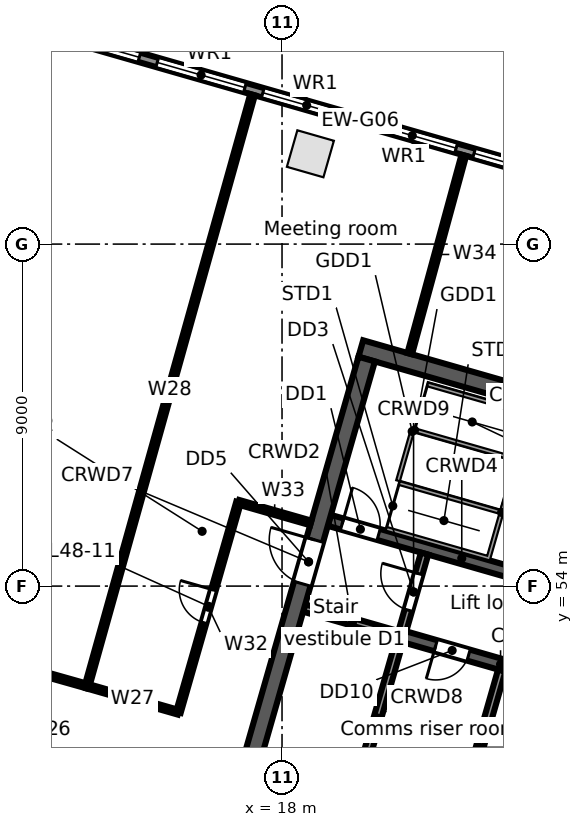
"""IFC4 building model, lengths in metres.
Left out: names, types, materials, properties, quantities, classifications, styles, units other than length and angle.
Written with IfcOpenShell. Run it as: python <this file> out.ifc"""

import sys

from ifc_helpers import new_model, si_unit, direction, frame, frame_2d, origin, origin_2d, place, context, subcontext, project, spatial, rectangle, extrude, element, fill, save


model = new_model("IFC4")
c1 = context("Model", 3, precision=1e-05, world=origin(), true_north=direction((0.0, 1.0)))
c2 = subcontext(c1, "Body", "Model", "MODEL_VIEW")
j1 = project(units=[si_unit("LENGTHUNIT", "METRE"), si_unit("PLANEANGLEUNIT", "RADIAN")], contexts=[c1])
p1 = place(None, origin())
s1 = spatial("IfcSite", under=j1, at=p1, CompositionType="ELEMENT")
p2 = place(p1, origin())
s2 = spatial("IfcBuilding", under=s1, at=p2, CompositionType="ELEMENT")
p3 = place(p2, frame((0.0, 0.0, 227.0)))
s3 = spatial("IfcBuildingStorey", under=s2, at=p3, CompositionType="ELEMENT", Elevation=227.0)
p4 = place(p3, frame((18.746, 65.376, 0.0), z_axis=(0.0, 0.0, 1.0), x_axis=(-0.961261695938, 0.275637355817, 0.0)))
e1 = element("IfcColumn", 1, at=p4, inside=s3, PredefinedType="COLUMN", context=c2, shape_type="SweptSolid", body=[
    extrude(rectangle(XDim=1.0, YDim=1.0, at=origin_2d()), origin(), (0.0, 0.0, 1.0), 3.9),
])
p5 = place(p3, frame((3.34, 71.042, 0.0), z_axis=(0.0, 0.0, 1.0), x_axis=(0.96126179431, -0.275637012753, 0.0)))
e2 = element("IfcWall", 2, at=p5, inside=s3, PredefinedType="STANDARD", context=c2, shape_type="SweptSolid", body=[
    extrude(rectangle(XDim=34.779, YDim=0.25, at=frame_2d((17.39, 0.0))), origin(), (0.0, 0.0, 1.0), 3.55),
])
p6 = place(p5, frame((32.071, 0.0, 0.8)))
e3 = element("IfcOpeningElement", 3, at=p6, cuts=e2, PredefinedType="OPENING", context=c2, shape_type="SweptSolid", body=[
    extrude(rectangle(XDim=2.4, YDim=2.2, at=frame_2d((1.2, 1.1))), frame((0.0, 0.135, 0.0), z_axis=(0.0, -1.0, 0.0), x_axis=(1.0, 0.0, 0.0)), (0.0, 0.0, 1.0), 0.27),
])
p7 = place(p5, frame((29.18, 0.0, 0.8)))
e4 = element("IfcOpeningElement", 4, at=p7, cuts=e2, PredefinedType="OPENING", context=c2, shape_type="SweptSolid", body=[
    extrude(rectangle(XDim=2.4, YDim=2.2, at=frame_2d((1.2, 1.1))), frame((0.0, 0.135, 0.0), z_axis=(0.0, -1.0, 0.0), x_axis=(1.0, 0.0, 0.0)), (0.0, 0.0, 1.0), 0.27),
])
p8 = place(p5, frame((26.289, 0.0, 0.8)))
e5 = element("IfcOpeningElement", 5, at=p8, cuts=e2, PredefinedType="OPENING", context=c2, shape_type="SweptSolid", body=[
    extrude(rectangle(XDim=2.4, YDim=2.2, at=frame_2d((1.2, 1.1))), frame((0.0, 0.135, 0.0), z_axis=(0.0, -1.0, 0.0), x_axis=(1.0, 0.0, 0.0)), (0.0, 0.0, 1.0), 0.27),
])
p9 = place(p5, frame((23.398, 0.0, 0.8)))
e6 = element("IfcOpeningElement", 6, at=p9, cuts=e2, PredefinedType="OPENING", context=c2, shape_type="SweptSolid", body=[
    extrude(rectangle(XDim=2.4, YDim=2.2, at=frame_2d((1.2, 1.1))), frame((0.0, 0.135, 0.0), z_axis=(0.0, -1.0, 0.0), x_axis=(1.0, 0.0, 0.0)), (0.0, 0.0, 1.0), 0.27),
])
p10 = place(p5, frame((20.508, 0.0, 0.8)))
e7 = element("IfcOpeningElement", 7, at=p10, cuts=e2, PredefinedType="OPENING", context=c2, shape_type="SweptSolid", body=[
    extrude(rectangle(XDim=2.4, YDim=2.2, at=frame_2d((1.2, 1.1))), frame((0.0, 0.135, 0.0), z_axis=(0.0, -1.0, 0.0), x_axis=(1.0, 0.0, 0.0)), (0.0, 0.0, 1.0), 0.27),
])
p11 = place(p5, frame((17.616, 0.0, 0.8)))
e8 = element("IfcOpeningElement", 8, at=p11, cuts=e2, PredefinedType="OPENING", context=c2, shape_type="SweptSolid", body=[
    extrude(rectangle(XDim=2.4, YDim=2.2, at=frame_2d((1.2, 1.1))), frame((0.0, 0.135, 0.0), z_axis=(0.0, -1.0, 0.0), x_axis=(1.0, 0.0, 0.0)), (0.0, 0.0, 1.0), 0.27),
])
p12 = place(p5, frame((14.726, 0.0, 0.8)))
e9 = element("IfcOpeningElement", 9, at=p12, cuts=e2, PredefinedType="OPENING", context=c2, shape_type="SweptSolid", body=[
    extrude(rectangle(XDim=2.4, YDim=2.2, at=frame_2d((1.2, 1.1))), frame((0.0, 0.135, 0.0), z_axis=(0.0, -1.0, 0.0), x_axis=(1.0, 0.0, 0.0)), (0.0, 0.0, 1.0), 0.27),
])
p13 = place(p5, frame((11.834, 0.0, 0.8)))
e10 = element("IfcOpeningElement", 10, at=p13, cuts=e2, PredefinedType="OPENING", context=c2, shape_type="SweptSolid", body=[
    extrude(rectangle(XDim=2.4, YDim=2.2, at=frame_2d((1.2, 1.1))), frame((0.0, 0.135, 0.0), z_axis=(0.0, -1.0, 0.0), x_axis=(1.0, 0.0, 0.0)), (0.0, 0.0, 1.0), 0.27),
])
p14 = place(p5, frame((8.944, 0.0, 0.8)))
e11 = element("IfcOpeningElement", 11, at=p14, cuts=e2, PredefinedType="OPENING", context=c2, shape_type="SweptSolid", body=[
    extrude(rectangle(XDim=2.4, YDim=2.2, at=frame_2d((1.2, 1.1))), frame((0.0, 0.135, 0.0), z_axis=(0.0, -1.0, 0.0), x_axis=(1.0, 0.0, 0.0)), (0.0, 0.0, 1.0), 0.27),
])
p15 = place(p5, frame((6.052, 0.0, 0.8)))
e12 = element("IfcOpeningElement", 12, at=p15, cuts=e2, PredefinedType="OPENING", context=c2, shape_type="SweptSolid", body=[
    extrude(rectangle(XDim=2.4, YDim=2.2, at=frame_2d((1.2, 1.1))), frame((0.0, 0.135, 0.0), z_axis=(0.0, -1.0, 0.0), x_axis=(1.0, 0.0, 0.0)), (0.0, 0.0, 1.0), 0.27),
])
p16 = place(p5, frame((3.162, 0.0, 0.8)))
e13 = element("IfcOpeningElement", 13, at=p16, cuts=e2, PredefinedType="OPENING", context=c2, shape_type="SweptSolid", body=[
    extrude(rectangle(XDim=2.4, YDim=2.2, at=frame_2d((1.2, 1.1))), frame((0.0, 0.135, 0.0), z_axis=(0.0, -1.0, 0.0), x_axis=(1.0, 0.0, 0.0)), (0.0, 0.0, 1.0), 0.27),
])
p17 = place(p5, frame((0.271, 0.0, 0.8)))
e14 = element("IfcOpeningElement", 14, at=p17, cuts=e2, PredefinedType="OPENING", context=c2, shape_type="SweptSolid", body=[
    extrude(rectangle(XDim=2.4, YDim=2.2, at=frame_2d((1.2, 1.1))), frame((0.0, 0.135, 0.0), z_axis=(0.0, -1.0, 0.0), x_axis=(1.0, 0.0, 0.0)), (0.0, 0.0, 1.0), 0.27),
])
p18 = place(p3, frame((18.583, 53.423, 0.0), z_axis=(0.0, 0.0, 1.0), x_axis=(0.961259287968, -0.275645753268, 0.0)))
e15 = element("IfcWall", 15, at=p18, inside=s3, PredefinedType="SOLIDWALL", context=c2, shape_type="SweptSolid", body=[
    extrude(rectangle(XDim=2.65, YDim=0.2, at=frame_2d((1.325, 0.0))), origin(), (0.0, 0.0, 1.0), 3.55),
])
p19 = place(p3, frame((21.131, 52.692, 0.0), z_axis=(0.0, 0.0, 1.0), x_axis=(0.961261488075, -0.275638080722, 0.0)))
e16 = element("IfcWall", 16, at=p19, inside=s3, PredefinedType="SOLIDWALL", context=c2, shape_type="SweptSolid", body=[
    extrude(rectangle(XDim=5.45, YDim=0.3, at=frame_2d((2.725, 0.0))), origin(), (0.0, 0.0, 1.0), 3.55),
])
p20 = place(p19, frame((0.95, 0.0, 0.0)))
e17 = element("IfcOpeningElement", 17, at=p20, cuts=e16, PredefinedType="OPENING", context=c2, shape_type="SweptSolid", body=[
    extrude(rectangle(XDim=0.9, YDim=2.1, at=frame_2d((0.45, 1.05))), frame((0.0, 0.16, 0.0), z_axis=(0.0, -1.0, 0.0), x_axis=(1.0, 0.0, 0.0)), (0.0, 0.0, 1.0), 0.32),
])
p21 = place(p19, frame((3.75, 0.0, 0.0)))
e18 = element("IfcOpeningElement", 18, at=p21, cuts=e16, PredefinedType="OPENING", context=c2, shape_type="SweptSolid", body=[
    extrude(rectangle(XDim=0.9, YDim=2.1, at=frame_2d((0.45, 1.05))), frame((0.0, 0.16, 0.0), z_axis=(0.0, -1.0, 0.0), x_axis=(1.0, 0.0, 0.0)), (0.0, 0.0, 1.0), 0.32),
])
p22 = place(p3, frame((19.245, 55.73, 0.0), z_axis=(0.0, 0.0, 1.0), x_axis=(0.961263007877, -0.275632780503, 0.0)))
e19 = element("IfcWall", 19, at=p22, inside=s3, PredefinedType="SOLIDWALL", context=c2, shape_type="SweptSolid", body=[
    extrude(rectangle(XDim=7.25, YDim=0.3, at=frame_2d((3.625, 0.0))), origin(), (0.0, 0.0, 1.0), 3.55),
])
p23 = place(p22, frame((0.35, 0.0, 0.0)))
e20 = element("IfcOpeningElement", 20, at=p23, cuts=e19, PredefinedType="OPENING", context=c2, shape_type="SweptSolid", body=[
    extrude(rectangle(XDim=1.0, YDim=2.1, at=frame_2d((0.5, 1.05))), frame((0.0, 0.16, 0.0), z_axis=(0.0, -1.0, 0.0), x_axis=(1.0, 0.0, 0.0)), (0.0, 0.0, 1.0), 0.32),
])
p24 = place(p3, frame((20.073, 60.252, 0.0), z_axis=(0.0, 0.0, 1.0), x_axis=(0.96126248289, -0.275634611374, 0.0)))
e21 = element("IfcWall", 21, at=p24, inside=s3, PredefinedType="SOLIDWALL", context=c2, shape_type="SweptSolid", body=[
    extrude(rectangle(XDim=9.0, YDim=0.45, at=frame_2d((4.5, 0.0))), origin(), (0.0, 0.0, 1.0), 3.55),
])
p25 = place(p3, frame((17.168, 49.303, 0.0), z_axis=(0.0, 0.0, 1.0), x_axis=(0.275638974822, 0.961261231695, 0.0)))
e22 = element("IfcWall", 22, at=p25, inside=s3, PredefinedType="SOLIDWALL", context=c2, shape_type="SweptSolid", body=[
    extrude(rectangle(XDim=11.1, YDim=0.45, at=frame_2d((5.55, 0.0))), origin(), (0.0, 0.0, 1.0), 3.55),
])
p26 = place(p25, frame((4.95, 0.0, 0.0)))
e23 = element("IfcOpeningElement", 23, at=p26, cuts=e22, PredefinedType="OPENING", context=c2, shape_type="SweptSolid", body=[
    extrude(rectangle(XDim=1.2, YDim=2.1, at=frame_2d((0.6, 1.05))), frame((0.0, 0.235, 0.0), z_axis=(0.0, -1.0, 0.0), x_axis=(1.0, 0.0, 0.0)), (0.0, 0.0, 1.0), 0.47),
])
p27 = place(p3, frame((19.932, 48.511, 0.0), z_axis=(0.0, 0.0, 1.0), x_axis=(0.275642273411, 0.961260285827, 0.0)))
e24 = element("IfcWall", 24, at=p27, inside=s3, PredefinedType="SOLIDWALL", context=c2, shape_type="SweptSolid", body=[
    extrude(rectangle(XDim=4.2, YDim=0.2, at=frame_2d((2.1, 0.0))), origin(), (0.0, 0.0, 1.0), 3.55),
])
p28 = place(p3, frame((21.172, 52.837, 0.0), z_axis=(0.0, 0.0, 1.0), x_axis=(0.275657676022, 0.961255868981, 0.0)))
e25 = element("IfcWall", 25, at=p28, inside=s3, PredefinedType="PARTITIONING", context=c2, shape_type="SweptSolid", body=[
    extrude(rectangle(XDim=2.1, YDim=0.2, at=frame_2d((1.05, 0.0))), origin(), (0.0, 0.0, 1.0), 3.55),
])
p29 = place(p28, frame((0.55, 0.0, 0.0)))
e26 = element("IfcOpeningElement", 26, at=p29, cuts=e25, PredefinedType="OPENING", context=c2, shape_type="SweptSolid", body=[
    extrude(rectangle(XDim=1.0, YDim=2.1, at=frame_2d((0.5, 1.05))), frame((0.0, 0.11, 0.0), z_axis=(0.0, -1.0, 0.0), x_axis=(1.0, 0.0, 0.0)), (0.0, 0.0, 1.0), 0.22),
])
p30 = place(p3, frame((22.623, 47.739, 0.0), z_axis=(0.0, 0.0, 1.0), x_axis=(0.275642273411, 0.961260285827, 0.0)))
e27 = element("IfcWall", 27, at=p30, inside=s3, PredefinedType="PARTITIONING", context=c2, shape_type="SweptSolid", body=[
    extrude(rectangle(XDim=4.2, YDim=0.2, at=frame_2d((2.1, 0.0))), origin(), (0.0, 0.0, 1.0), 3.55),
])
p31 = place(p3, frame((0.0, 55.0, 0.0), z_axis=(0.0, 0.0, 1.0), x_axis=(0.962402937884, -0.271625818271, 0.0)))
e28 = element("IfcWall", 28, at=p31, inside=s3, PredefinedType="PARTITIONING", context=c2, shape_type="SweptSolid", body=[
    extrude(rectangle(XDim=13.372, YDim=0.125, at=frame_2d((6.686, 0.0))), origin(), (0.0, 0.0, 1.0), 2.618),
])
p32 = place(p31, frame((5.7, 0.0, 0.0)))
e29 = element("IfcOpeningElement", 29, at=p32, cuts=e28, PredefinedType="OPENING", context=c2, shape_type="SweptSolid", body=[
    extrude(rectangle(XDim=1.8, YDim=2.1, at=frame_2d((0.9, 1.05))), frame((0.0, 0.073, 0.0), z_axis=(0.0, -1.0, 0.0), x_axis=(1.0, 0.0, 0.0)), (0.0, 0.0, 1.0), 0.145),
])
p33 = place(p3, frame((6.482, 50.859, 0.0), z_axis=(0.0, 0.0, 1.0), x_axis=(0.961261196169, -0.275639098713, 0.0)))
e30 = element("IfcWall", 30, at=p33, inside=s3, PredefinedType="PARTITIONING", context=c2, shape_type="SweptSolid", body=[
    extrude(rectangle(XDim=8.5, YDim=0.125, at=frame_2d((4.25, 0.0))), origin(), (0.0, 0.0, 1.0), 2.618),
])
p34 = place(p33, frame((3.7, 0.0, 0.0)))
e31 = element("IfcOpeningElement", 31, at=p34, cuts=e30, PredefinedType="OPENING", context=c2, shape_type="SweptSolid", body=[
    extrude(rectangle(XDim=0.9, YDim=2.1, at=frame_2d((0.45, 1.05))), frame((0.0, 0.073, 0.0), z_axis=(0.0, -1.0, 0.0), x_axis=(1.0, 0.0, 0.0)), (0.0, 0.0, 1.0), 0.145),
])
p35 = place(p3, frame((12.869, 51.368, 0.0), z_axis=(0.0, 0.0, 1.0), x_axis=(0.961302601161, -0.275494662382, 0.0)))
e32 = element("IfcWall", 32, at=p35, inside=s3, PredefinedType="PARTITIONING", context=c2, shape_type="SweptSolid", body=[
    extrude(rectangle(XDim=2.501, YDim=0.125, at=frame_2d((1.25, 0.0))), origin(), (0.0, 0.0, 1.0), 3.55),
])
p36 = place(p3, frame((12.869, 51.368, 0.0), z_axis=(0.0, 0.0, 1.0), x_axis=(0.269547555311, 0.962987079574, 0.0)))
e33 = element("IfcWall", 33, at=p36, inside=s3, PredefinedType="PARTITIONING", context=c2, shape_type="SweptSolid", body=[
    extrude(rectangle(XDim=16.161, YDim=0.125, at=frame_2d((8.081, 0.0))), origin(), (0.0, 0.0, 1.0), 2.618),
])
p37 = place(p3, frame((15.273, 50.679, 0.0), z_axis=(0.0, 0.0, 1.0), x_axis=(0.275494973205, 0.961302512084, 0.0)))
e34 = element("IfcWall", 34, at=p37, inside=s3, PredefinedType="PARTITIONING", context=c2, shape_type="SweptSolid", body=[
    extrude(rectangle(XDim=5.75, YDim=0.125, at=frame_2d((2.875, 0.0))), origin(), (0.0, 0.0, 1.0), 2.618),
])
p38 = place(p37, frame((2.45, 0.0, 0.0)))
e35 = element("IfcOpeningElement", 35, at=p38, cuts=e34, PredefinedType="OPENING", context=c2, shape_type="SweptSolid", body=[
    extrude(rectangle(XDim=0.9, YDim=2.1, at=frame_2d((0.45, 1.05))), frame((0.0, 0.073, 0.0), z_axis=(0.0, -1.0, 0.0), x_axis=(1.0, 0.0, 0.0)), (0.0, 0.0, 1.0), 0.145),
])
p39 = place(p3, frame((16.857, 56.206, 0.0), z_axis=(0.0, 0.0, 1.0), x_axis=(0.961383985066, -0.275210525341, 0.0)))
e36 = element("IfcWall", 36, at=p39, inside=s3, PredefinedType="PARTITIONING", context=c2, shape_type="SweptSolid", body=[
    extrude(rectangle(XDim=1.977, YDim=0.125, at=frame_2d((0.988, 0.0))), origin(), (0.0, 0.0, 1.0), 3.55),
])
p40 = place(p3, frame((21.36, 60.117, 0.0), z_axis=(0.0, 0.0, 1.0), x_axis=(0.263151767798, 0.964754449124, 0.0)))
e37 = element("IfcWall", 37, at=p40, inside=s3, PredefinedType="PARTITIONING", context=c2, shape_type="SweptSolid", body=[
    extrude(rectangle(XDim=5.411, YDim=0.125, at=frame_2d((2.705, 0.0))), origin(), (0.0, 0.0, 1.0), 2.918),
])
p41 = place(p10, origin())
e38 = element("IfcWindow", 38, at=p41, inside=s3, PartitioningType="SINGLE_PANEL", PredefinedType="WINDOW", context=c2, shape_type="SweptSolid", body=[
    extrude(rectangle(XDim=2.4, YDim=2.2, at=frame_2d((1.2, 1.1))), frame((0.0, 0.03, 0.0), z_axis=(0.0, -1.0, 0.0), x_axis=(1.0, 0.0, 0.0)), (0.0, 0.0, 1.0), 0.06),
])
fill(e7, e38)
p42 = place(p11, origin())
e39 = element("IfcWindow", 39, at=p42, inside=s3, PartitioningType="SINGLE_PANEL", PredefinedType="WINDOW", context=c2, shape_type="SweptSolid", body=[
    extrude(rectangle(XDim=2.4, YDim=2.2, at=frame_2d((1.2, 1.1))), frame((0.0, 0.03, 0.0), z_axis=(0.0, -1.0, 0.0), x_axis=(1.0, 0.0, 0.0)), (0.0, 0.0, 1.0), 0.06),
])
fill(e8, e39)
p43 = place(p12, origin())
e40 = element("IfcWindow", 40, at=p43, inside=s3, PartitioningType="SINGLE_PANEL", PredefinedType="WINDOW", context=c2, shape_type="SweptSolid", body=[
    extrude(rectangle(XDim=2.4, YDim=2.2, at=frame_2d((1.2, 1.1))), frame((0.0, 0.03, 0.0), z_axis=(0.0, -1.0, 0.0), x_axis=(1.0, 0.0, 0.0)), (0.0, 0.0, 1.0), 0.06),
])
fill(e9, e40)
p44 = place(p13, origin())
e41 = element("IfcWindow", 41, at=p44, inside=s3, PartitioningType="SINGLE_PANEL", PredefinedType="WINDOW", context=c2, shape_type="SweptSolid", body=[
    extrude(rectangle(XDim=2.4, YDim=2.2, at=frame_2d((1.2, 1.1))), frame((0.0, 0.03, 0.0), z_axis=(0.0, -1.0, 0.0), x_axis=(1.0, 0.0, 0.0)), (0.0, 0.0, 1.0), 0.06),
])
fill(e10, e41)
p45 = place(p14, origin())
e42 = element("IfcWindow", 42, at=p45, inside=s3, PartitioningType="SINGLE_PANEL", PredefinedType="WINDOW", context=c2, shape_type="SweptSolid", body=[
    extrude(rectangle(XDim=2.4, YDim=2.2, at=frame_2d((1.2, 1.1))), frame((0.0, 0.03, 0.0), z_axis=(0.0, -1.0, 0.0), x_axis=(1.0, 0.0, 0.0)), (0.0, 0.0, 1.0), 0.06),
])
fill(e11, e42)
p46 = place(p23, origin())
e43 = element("IfcDoor", 43, at=p46, inside=s3, OperationType="SINGLE_SWING_LEFT", PredefinedType="DOOR", context=c2, shape_type="SweptSolid", body=[
    extrude(rectangle(XDim=1.0, YDim=2.1, at=frame_2d((0.5, 1.05))), frame((0.0, 0.025, 0.0), z_axis=(0.0, -1.0, 0.0), x_axis=(1.0, 0.0, 0.0)), (0.0, 0.0, 1.0), 0.05),
])
fill(e20, e43)
p47 = place(p29, origin())
e44 = element("IfcDoor", 44, at=p47, inside=s3, OperationType="SINGLE_SWING_RIGHT", PredefinedType="DOOR", context=c2, shape_type="SweptSolid", body=[
    extrude(rectangle(XDim=1.0, YDim=2.1, at=frame_2d((0.5, 1.05))), frame((0.0, 0.025, 0.0), z_axis=(0.0, -1.0, 0.0), x_axis=(1.0, 0.0, 0.0)), (0.0, 0.0, 1.0), 0.05),
])
fill(e26, e44)
p48 = place(p26, origin())
e45 = element("IfcDoor", 45, at=p48, inside=s3, OperationType="SINGLE_SWING_RIGHT", PredefinedType="DOOR", context=c2, shape_type="SweptSolid", body=[
    extrude(rectangle(XDim=1.2, YDim=2.1, at=frame_2d((0.6, 1.05))), frame((0.0, 0.025, 0.0), z_axis=(0.0, -1.0, 0.0), x_axis=(1.0, 0.0, 0.0)), (0.0, 0.0, 1.0), 0.05),
])
fill(e23, e45)
p49 = place(p20, frame((0.9, 0.0, 0.0), z_axis=(0.0, 0.0, 1.0), x_axis=(-1.0, 0.0, 0.0)))
e46 = element("IfcDoor", 46, at=p49, inside=s3, OperationType="SINGLE_SWING_RIGHT", PredefinedType="DOOR", context=c2, shape_type="SweptSolid", body=[
    extrude(rectangle(XDim=0.9, YDim=2.1, at=frame_2d((0.45, 1.05))), frame((0.0, 0.025, 0.0), z_axis=(0.0, -1.0, 0.0), x_axis=(1.0, 0.0, 0.0)), (0.0, 0.0, 1.0), 0.05),
])
fill(e17, e46)
p50 = place(p38, origin())
e47 = element("IfcDoor", 47, at=p50, inside=s3, OperationType="SINGLE_SWING_RIGHT", PredefinedType="DOOR", context=c2, shape_type="SweptSolid", body=[
    extrude(rectangle(XDim=0.9, YDim=2.1, at=frame_2d((0.45, 1.05))), frame((0.0, 0.025, 0.0), z_axis=(0.0, -1.0, 0.0), x_axis=(1.0, 0.0, 0.0)), (0.0, 0.0, 1.0), 0.05),
])
fill(e35, e47)
save(model, sys.argv[1])
